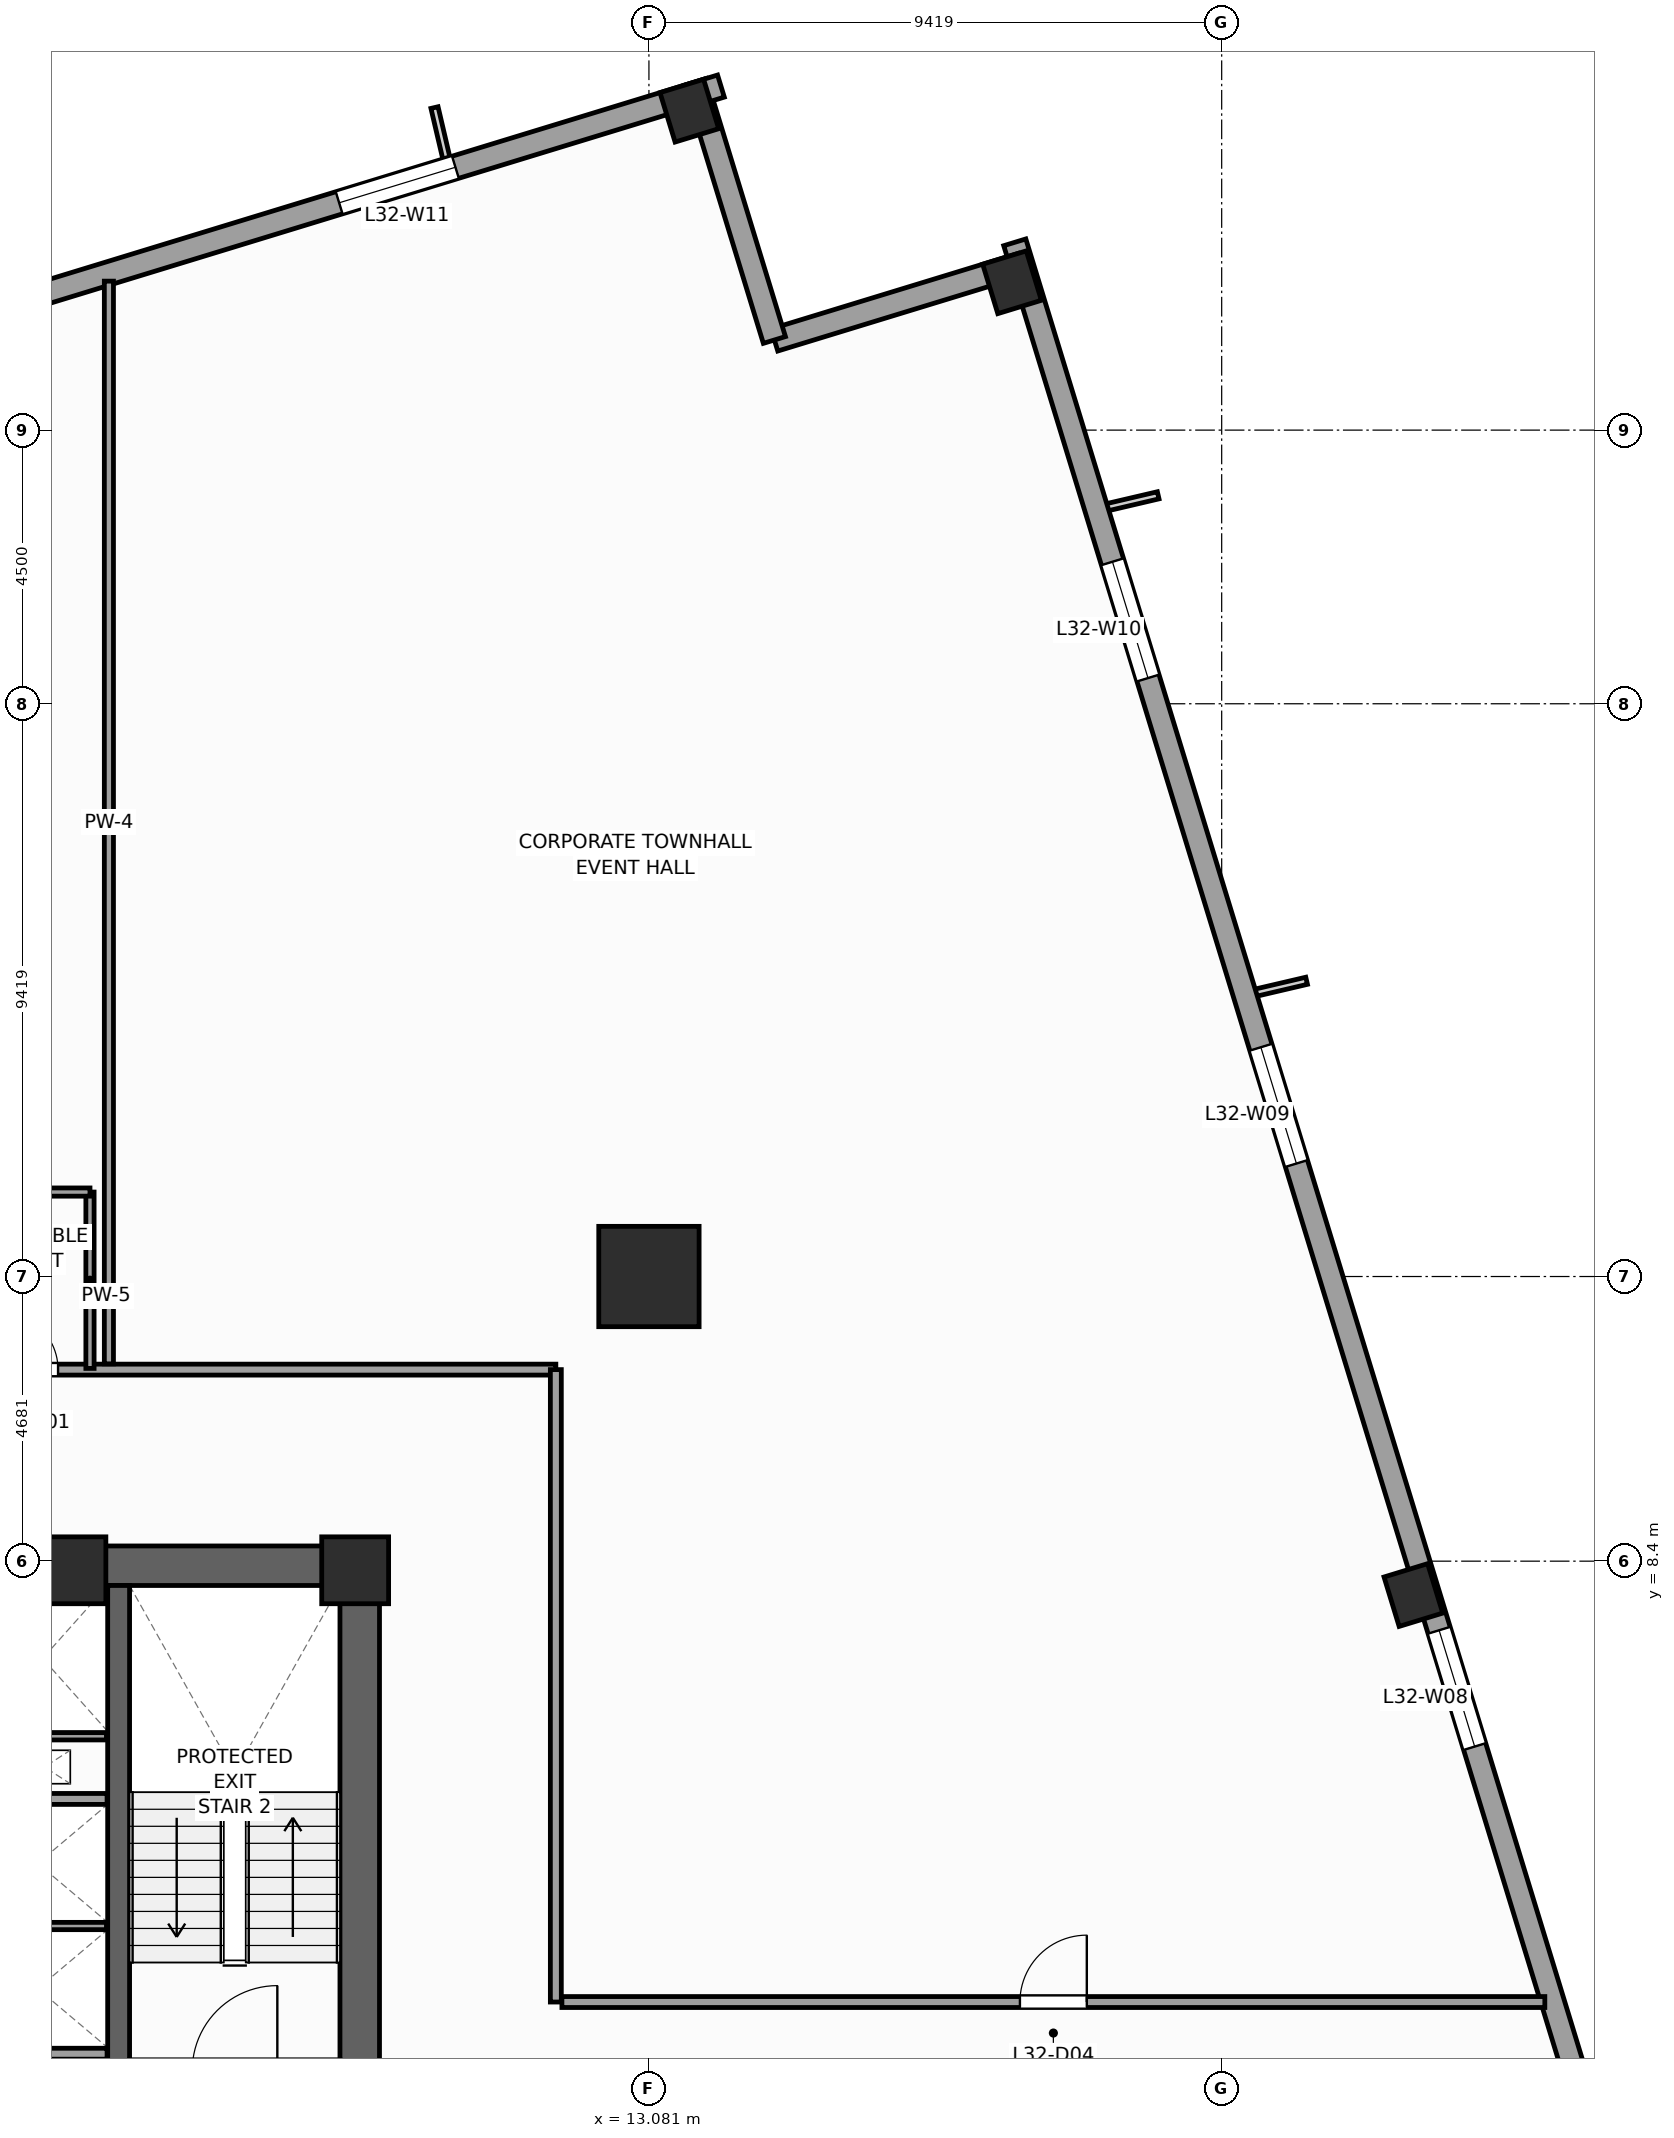
"""IFC4 building model, lengths in metres.
Left out: names, types, materials, properties, quantities, classifications, styles, units other than length and angle.
Written with IfcOpenShell. Run it as: python <this file> out.ifc"""

import sys

from ifc_helpers import new_model, si_unit, direction, frame, frame_2d, origin, origin_2d, place, context, subcontext, project, spatial, rectangle, extrude, source, transform, mapped, element, fill, save


model = new_model("IFC4")
c1 = context("Model", 3, precision=1e-05, world=origin(), true_north=direction((0.0, 1.0)))
c2 = subcontext(c1, "Body", "Model", "MODEL_VIEW")
j1 = project(units=[si_unit("LENGTHUNIT", "METRE"), si_unit("PLANEANGLEUNIT", "RADIAN")], contexts=[c1])
p1 = place(None, origin())
s1 = spatial("IfcSite", under=j1, at=p1, CompositionType="ELEMENT")
p2 = place(p1, origin())
s2 = spatial("IfcBuilding", under=s1, at=p2, CompositionType="ELEMENT")
p3 = place(p2, frame((0.0, 0.0, 135.2)))
s3 = spatial("IfcBuildingStorey", under=s2, at=p3, CompositionType="ELEMENT", Elevation=135.2)
p4 = place(p3, frame((-8.65, 8.325, 0.0), z_axis=(0.0, 0.0, 1.0), x_axis=(1.0, 0.0, 0.0)))
e1 = element("IfcWall", 1, at=p4, inside=s3, PredefinedType="SHEAR", context=c2, shape_type="SweptSolid", body=[
    extrude(rectangle(XDim=17.3, YDim=0.65, at=frame_2d((8.65, 0.0))), origin(), (0.0, 0.0, 1.0), 4.0),
])
p5 = place(p3, frame((8.325, -8.0, 0.0), z_axis=(0.0, 0.0, 1.0), x_axis=(0.0, 1.0, 0.0)))
e2 = element("IfcWall", 2, at=p5, inside=s3, PredefinedType="SHEAR", context=c2, shape_type="SweptSolid", body=[
    extrude(rectangle(XDim=16.0, YDim=0.65, at=frame_2d((8.0, 0.0))), origin(), (0.0, 0.0, 1.0), 4.0),
])
p6 = place(p5, frame((4.69, 0.0, 0.0)))
e3 = element("IfcOpeningElement", 3, at=p6, cuts=e2, PredefinedType="OPENING", context=c2, shape_type="SweptSolid", body=[
    extrude(rectangle(XDim=1.3, YDim=2.2, at=frame_2d((0.65, 1.1))), frame((0.0, 0.335, 0.0), z_axis=(0.0, -1.0, 0.0), x_axis=(1.0, 0.0, 0.0)), (0.0, 0.0, 1.0), 0.67),
])
p7 = place(p3, frame((4.36, -8.0, 0.0), z_axis=(0.0, 0.0, 1.0), x_axis=(0.0, 1.0, 0.0)))
e4 = element("IfcWall", 4, at=p7, inside=s3, PredefinedType="SHEAR", context=c2, shape_type="SweptSolid", body=[
    extrude(rectangle(XDim=16.0, YDim=0.36, at=frame_2d((8.0, 0.0))), origin(), (0.0, 0.0, 1.0), 4.0),
])
m1 = source(origin(), c2, "Body", "SweptSolid", [
    extrude(rectangle(XDim=1.1, YDim=1.1, at=origin_2d()), origin(), (0.0, 0.0, 1.0), 4.0),
])
for number, where, z_axis, x_axis in (
    (5, (8.25, 8.25, 0.0), (0.0, 0.0, 1.0), (1.0, 0.0, 0.0)),
    (6, (3.6, 8.25, 0.0), (0.0, 0.0, 1.0), (1.0, 0.0, 0.0)),
):
    element("IfcColumn", number, at=place(p3, frame(where, z_axis=z_axis, x_axis=x_axis)), inside=s3, PredefinedType="PILASTER", context=c2, shape_type="MappedRepresentation", body=[
        mapped(m1, transform((0.0, 0.0, 0.0), scale=1.0)),
    ])
m2 = source(origin(), c2, "Body", "SweptSolid", [
    extrude(rectangle(XDim=1.65, YDim=1.65, at=origin_2d()), origin(), (0.0, 0.0, 1.0), 4.0),
])
p8 = place(p3, frame((13.081, 13.081, 0.0), z_axis=(0.0, 0.0, 1.0), x_axis=(1.0, 0.0, 0.0)))
e7 = element("IfcColumn", 7, at=p8, inside=s3, PredefinedType="COLUMN", context=c2, shape_type="MappedRepresentation", body=[
    mapped(m2, transform((0.0, 0.0, 0.0), scale=1.0)),
])
m3 = source(origin(), c2, "Body", "SweptSolid", [
    extrude(rectangle(XDim=0.75, YDim=0.85, at=origin_2d()), origin(), (0.0, 0.0, 1.0), 4.0),
])
for number, where, z_axis, x_axis in (
    (8, (25.653, 7.843, 0.0), (0.0, 0.0, 1.0), (0.956, 0.292, 0.0)),
    (9, (19.052, 29.431, 0.0), (0.0, 0.0, 1.0), (0.956, 0.292, 0.0)),
    (10, (13.746, 32.253, 0.0), (0.0, 0.0, 1.0), (0.956, 0.292, 0.0)),
):
    element("IfcColumn", number, at=place(p3, frame(where, z_axis=z_axis, x_axis=x_axis)), inside=s3, PredefinedType="COLUMN", context=c2, shape_type="MappedRepresentation", body=[
        mapped(m3, transform((0.0, 0.0, 0.0), scale=1.0)),
    ])
p9 = place(p3, frame((32.658, -14.265, 0.0), z_axis=(0.0, 0.0, 1.0), x_axis=(-0.292373127906, 0.956304320851, 0.0)))
e11 = element("IfcWall", 11, at=p9, inside=s3, PredefinedType="STANDARD", context=c2, shape_type="SweptSolid", body=[
    extrude(rectangle(XDim=46.38, YDim=0.38, at=frame_2d((23.19, 0.0))), origin(), (0.0, 0.0, 1.0), 2.2),
])
p10 = place(p9, frame((4.566, 0.0, 0.67)))
e12 = element("IfcOpeningElement", 12, at=p10, cuts=e11, PredefinedType="OPENING", context=c2, shape_type="SweptSolid", body=[
    extrude(rectangle(XDim=2.0, YDim=1.45, at=frame_2d((1.0, 0.725))), frame((0.0, 0.2, 0.0), z_axis=(0.0, -1.0, 0.0), x_axis=(1.0, 0.0, 0.0)), (0.0, 0.0, 1.0), 0.4),
])
p11 = place(p9, frame((10.95, 0.0, 0.67)))
e13 = element("IfcOpeningElement", 13, at=p11, cuts=e11, PredefinedType="OPENING", context=c2, shape_type="SweptSolid", body=[
    extrude(rectangle(XDim=2.0, YDim=1.45, at=frame_2d((1.0, 0.725))), frame((0.0, 0.2, 0.0), z_axis=(0.0, -1.0, 0.0), x_axis=(1.0, 0.0, 0.0)), (0.0, 0.0, 1.0), 0.4),
])
p12 = place(p9, frame((20.512, 0.0, 0.67)))
e14 = element("IfcOpeningElement", 14, at=p12, cuts=e11, PredefinedType="OPENING", context=c2, shape_type="SweptSolid", body=[
    extrude(rectangle(XDim=2.0, YDim=1.45, at=frame_2d((1.0, 0.725))), frame((0.0, 0.2, 0.0), z_axis=(0.0, -1.0, 0.0), x_axis=(1.0, 0.0, 0.0)), (0.0, 0.0, 1.0), 0.4),
])
p13 = place(p9, frame((30.538, 0.0, 0.67)))
e15 = element("IfcOpeningElement", 15, at=p13, cuts=e11, PredefinedType="OPENING", context=c2, shape_type="SweptSolid", body=[
    extrude(rectangle(XDim=2.0, YDim=1.45, at=frame_2d((1.0, 0.725))), frame((0.0, 0.2, 0.0), z_axis=(0.0, -1.0, 0.0), x_axis=(1.0, 0.0, 0.0)), (0.0, 0.0, 1.0), 0.4),
])
p14 = place(p9, frame((38.887, 0.0, 0.67)))
e16 = element("IfcOpeningElement", 16, at=p14, cuts=e11, PredefinedType="OPENING", context=c2, shape_type="SweptSolid", body=[
    extrude(rectangle(XDim=2.0, YDim=1.45, at=frame_2d((1.0, 0.725))), frame((0.0, 0.2, 0.0), z_axis=(0.0, -1.0, 0.0), x_axis=(1.0, 0.0, 0.0)), (0.0, 0.0, 1.0), 0.4),
])
p15 = place(p3, frame((19.208, 29.725, 0.0), z_axis=(0.0, 0.0, 1.0), x_axis=(-0.956312764915, -0.292345507338, 0.0)))
e17 = element("IfcWall", 17, at=p15, inside=s3, PredefinedType="STANDARD", context=c2, shape_type="SweptSolid", body=[
    extrude(rectangle(XDim=4.25, YDim=0.38, at=frame_2d((2.125, 0.0))), origin(), (0.0, 0.0, 1.0), 3.6),
])
p16 = place(p3, frame((15.144, 28.482, 0.0), z_axis=(0.0, 0.0, 1.0), x_axis=(-0.292373601522, 0.956304176051, 0.0)))
e18 = element("IfcWall", 18, at=p16, inside=s3, PredefinedType="STANDARD", context=c2, shape_type="SweptSolid", body=[
    extrude(rectangle(XDim=4.44, YDim=0.38, at=frame_2d((2.22, 0.0))), origin(), (0.0, 0.0, 1.0), 2.2),
])
p17 = place(p3, frame((14.265, 32.658, 0.0), z_axis=(0.0, 0.0, 1.0), x_axis=(-0.956304320851, -0.292373127906, 0.0)))
e19 = element("IfcWall", 19, at=p17, inside=s3, PredefinedType="STANDARD", context=c2, shape_type="SweptSolid", body=[
    extrude(rectangle(XDim=46.38, YDim=0.38, at=frame_2d((23.19, 0.0))), origin(), (0.0, 0.0, 1.0), 2.2),
])
p18 = place(p17, frame((28.265, 0.0, 0.0)))
e20 = element("IfcOpeningElement", 20, at=p18, cuts=e19, PredefinedType="OPENING", context=c2, shape_type="SweptSolid", body=[
    extrude(rectangle(XDim=1.05, YDim=2.02, at=frame_2d((0.525, 1.01))), frame((0.0, 0.2, 0.0), z_axis=(0.0, -1.0, 0.0), x_axis=(1.0, 0.0, 0.0)), (0.0, 0.0, 1.0), 0.4),
])
p19 = place(p17, frame((4.566, 0.0, 0.67)))
e21 = element("IfcOpeningElement", 21, at=p19, cuts=e19, PredefinedType="OPENING", context=c2, shape_type="SweptSolid", body=[
    extrude(rectangle(XDim=2.0, YDim=1.45, at=frame_2d((1.0, 0.725))), frame((0.0, 0.2, 0.0), z_axis=(0.0, -1.0, 0.0), x_axis=(1.0, 0.0, 0.0)), (0.0, 0.0, 1.0), 0.4),
])
p20 = place(p17, frame((12.45, 0.0, 0.67)))
e22 = element("IfcOpeningElement", 22, at=p20, cuts=e19, PredefinedType="OPENING", context=c2, shape_type="SweptSolid", body=[
    extrude(rectangle(XDim=2.0, YDim=1.45, at=frame_2d((1.0, 0.725))), frame((0.0, 0.2, 0.0), z_axis=(0.0, -1.0, 0.0), x_axis=(1.0, 0.0, 0.0)), (0.0, 0.0, 1.0), 0.4),
])
p21 = place(p17, frame((20.512, 0.0, 0.67)))
e23 = element("IfcOpeningElement", 23, at=p21, cuts=e19, PredefinedType="OPENING", context=c2, shape_type="SweptSolid", body=[
    extrude(rectangle(XDim=2.0, YDim=1.45, at=frame_2d((1.0, 0.725))), frame((0.0, 0.2, 0.0), z_axis=(0.0, -1.0, 0.0), x_axis=(1.0, 0.0, 0.0)), (0.0, 0.0, 1.0), 0.4),
])
p22 = place(p17, frame((30.538, 0.0, 0.67)))
e24 = element("IfcOpeningElement", 24, at=p22, cuts=e19, PredefinedType="OPENING", context=c2, shape_type="SweptSolid", body=[
    extrude(rectangle(XDim=2.0, YDim=1.45, at=frame_2d((1.0, 0.725))), frame((0.0, 0.2, 0.0), z_axis=(0.0, -1.0, 0.0), x_axis=(1.0, 0.0, 0.0)), (0.0, 0.0, 1.0), 0.4),
])
p23 = place(p17, frame((38.887, 0.0, 0.67)))
e25 = element("IfcOpeningElement", 25, at=p23, cuts=e19, PredefinedType="OPENING", context=c2, shape_type="SweptSolid", body=[
    extrude(rectangle(XDim=2.0, YDim=1.45, at=frame_2d((1.0, 0.725))), frame((0.0, 0.2, 0.0), z_axis=(0.0, -1.0, 0.0), x_axis=(1.0, 0.0, 0.0)), (0.0, 0.0, 1.0), 0.4),
])
for number, where, z_axis, x_axis in (
    (26, (1.89, 0.3, 0.0), (0.0, 0.0, 1.0), (1.0, 0.0, 0.0)),
    (27, (1.89, 4.49, 0.0), (0.0, 0.0, 1.0), (1.0, 0.0, 0.0)),
):
    element("IfcWall", number, at=place(p3, frame(where, z_axis=z_axis, x_axis=x_axis)), inside=s3, PredefinedType="PARTITIONING", context=c2, shape_type="SweptSolid", body=[
        extrude(rectangle(XDim=2.28, YDim=0.18, at=frame_2d((1.14, 0.0))), origin(), (0.0, 0.0, 1.0), 3.6),
    ])
p24 = place(p3, frame((1.9, 2.4, 0.0), z_axis=(0.0, 0.0, 1.0), x_axis=(1.0, 0.0, 0.0)))
e28 = element("IfcWall", 28, at=p24, inside=s3, PredefinedType="PARTITIONING", context=c2, shape_type="SweptSolid", body=[
    extrude(rectangle(XDim=2.26, YDim=0.12, at=frame_2d((1.13, 0.0))), origin(), (0.0, 0.0, 1.0), 3.6),
])
p25 = place(p3, frame((2.06, 5.52, 0.0), z_axis=(0.0, 0.0, 1.0), x_axis=(1.0, 0.0, 0.0)))
e29 = element("IfcWall", 29, at=p25, inside=s3, PredefinedType="PARTITIONING", context=c2, shape_type="SweptSolid", body=[
    extrude(rectangle(XDim=2.1, YDim=0.12, at=frame_2d((1.05, 0.0))), origin(), (0.0, 0.0, 1.0), 3.6),
])
p26 = place(p3, frame((-12.6, 11.55, 0.0), z_axis=(0.0, 0.0, 1.0), x_axis=(1.0, 0.0, 0.0)))
e30 = element("IfcWall", 30, at=p26, inside=s3, PredefinedType="PARTITIONING", context=c2, shape_type="SweptSolid", body=[
    extrude(rectangle(XDim=24.15, YDim=0.18, at=frame_2d((12.075, 0.0))), origin(), (0.0, 0.0, 1.0), 3.6),
])
p27 = place(p26, frame((15.014, 0.0, 0.0)))
e31 = element("IfcOpeningElement", 31, at=p27, cuts=e30, PredefinedType="OPENING", context=c2, shape_type="SweptSolid", body=[
    extrude(rectangle(XDim=0.95, YDim=2.1, at=frame_2d((0.475, 1.05))), frame((0.0, 0.1, 0.0), z_axis=(0.0, -1.0, 0.0), x_axis=(1.0, 0.0, 0.0)), (0.0, 0.0, 1.0), 0.2),
])
p28 = place(p26, frame((12.59, 0.0, 0.0)))
e32 = element("IfcOpeningElement", 32, at=p28, cuts=e30, PredefinedType="OPENING", context=c2, shape_type="SweptSolid", body=[
    extrude(rectangle(XDim=0.95, YDim=2.1, at=frame_2d((0.475, 1.05))), frame((0.0, 0.1, 0.0), z_axis=(0.0, -1.0, 0.0), x_axis=(1.0, 0.0, 0.0)), (0.0, 0.0, 1.0), 0.2),
])
p29 = place(p3, frame((11.55, 1.15, 0.0), z_axis=(0.0, 0.0, 1.0), x_axis=(0.0, 1.0, 0.0)))
e33 = element("IfcWall", 33, at=p29, inside=s3, PredefinedType="PARTITIONING", context=c2, shape_type="SweptSolid", body=[
    extrude(rectangle(XDim=10.4, YDim=0.18, at=frame_2d((5.2, 0.0))), origin(), (0.0, 0.0, 1.0), 3.6),
])
p30 = place(p3, frame((11.65, 1.15, 0.0), z_axis=(0.0, 0.0, 1.0), x_axis=(1.0, 0.0, 0.0)))
e34 = element("IfcWall", 34, at=p30, inside=s3, PredefinedType="PARTITIONING", context=c2, shape_type="SweptSolid", body=[
    extrude(rectangle(XDim=16.164, YDim=0.18, at=frame_2d((8.082, 0.0))), origin(), (0.0, 0.0, 1.0), 3.6),
])
p31 = place(p30, frame((7.532, 0.0, 0.0)))
e35 = element("IfcOpeningElement", 35, at=p31, cuts=e34, PredefinedType="OPENING", context=c2, shape_type="SweptSolid", body=[
    extrude(rectangle(XDim=1.1, YDim=2.2, at=frame_2d((0.55, 1.1))), frame((0.0, 0.1, 0.0), z_axis=(0.0, -1.0, 0.0), x_axis=(1.0, 0.0, 0.0)), (0.0, 0.0, 1.0), 0.2),
])
p32 = place(p3, frame((4.2, 11.645, 0.0), z_axis=(0.0, 0.0, 1.0), x_axis=(0.0, 1.0, 0.0)))
e36 = element("IfcWall", 36, at=p32, inside=s3, PredefinedType="PARTITIONING", context=c2, shape_type="SweptSolid", body=[
    extrude(rectangle(XDim=17.805, YDim=0.15, at=frame_2d((8.902, 0.0))), origin(), (0.0, 0.0, 1.0), 3.6),
])
p33 = place(p3, frame((3.889, 11.57, 0.0), z_axis=(0.0, 0.0, 1.0), x_axis=(0.0, 1.0, 0.0)))
e37 = element("IfcWall", 37, at=p33, inside=s3, PredefinedType="PARTITIONING", context=c2, shape_type="SweptSolid", body=[
    extrude(rectangle(XDim=2.9, YDim=0.135, at=frame_2d((1.45, 0.0))), origin(), (0.0, 0.0, 1.0), 3.6),
])
p34 = place(p3, frame((1.889, 14.47, 0.0), z_axis=(0.0, 0.0, 1.0), x_axis=(1.0, 0.0, 0.0)))
e38 = element("IfcWall", 38, at=p34, inside=s3, PredefinedType="PARTITIONING", context=c2, shape_type="SweptSolid", body=[
    extrude(rectangle(XDim=2.0, YDim=0.135, at=frame_2d((1.0, 0.0))), origin(), (0.0, 0.0, 1.0), 3.6),
])
m4 = source(origin(), c2, "Body", "SweptSolid", [
    extrude(rectangle(XDim=2.0, YDim=1.45, at=frame_2d((1.0, 0.725))), frame((0.0, 0.03, 0.0), z_axis=(0.0, -1.0, 0.0), x_axis=(1.0, 0.0, 0.0)), (0.0, 0.0, 1.0), 0.06),
])
p35 = place(p12, origin())
e39 = element("IfcWindow", 39, at=p35, inside=s3, PartitioningType="SINGLE_PANEL", PredefinedType="WINDOW", context=c2, shape_type="MappedRepresentation", body=[
    mapped(m4, transform((0.0, 0.0, 0.0), scale=1.0)),
])
fill(e14, e39)
p36 = place(p13, origin())
e40 = element("IfcWindow", 40, at=p36, inside=s3, PartitioningType="SINGLE_PANEL", PredefinedType="WINDOW", context=c2, shape_type="MappedRepresentation", body=[
    mapped(m4, transform((0.0, 0.0, 0.0), scale=1.0)),
])
fill(e15, e40)
p37 = place(p14, origin())
e41 = element("IfcWindow", 41, at=p37, inside=s3, PartitioningType="SINGLE_PANEL", PredefinedType="WINDOW", context=c2, shape_type="MappedRepresentation", body=[
    mapped(m4, transform((0.0, 0.0, 0.0), scale=1.0)),
])
fill(e16, e41)
p38 = place(p19, origin())
e42 = element("IfcWindow", 42, at=p38, inside=s3, PartitioningType="SINGLE_PANEL", PredefinedType="WINDOW", context=c2, shape_type="MappedRepresentation", body=[
    mapped(m4, transform((0.0, 0.0, 0.0), scale=1.0)),
])
fill(e21, e42)
m5 = source(origin(), c2, "Body", "SweptSolid", [
    extrude(rectangle(XDim=0.95, YDim=2.1, at=frame_2d((0.475, 1.05))), frame((0.0, 0.025, 0.0), z_axis=(0.0, -1.0, 0.0), x_axis=(1.0, 0.0, 0.0)), (0.0, 0.0, 1.0), 0.05),
])
p39 = place(p27, origin())
e43 = element("IfcDoor", 43, at=p39, inside=s3, OperationType="SINGLE_SWING_LEFT", PredefinedType="DOOR", context=c2, shape_type="MappedRepresentation", body=[
    mapped(m5, transform((0.0, 0.0, 0.0), scale=1.0)),
])
fill(e31, e43)
m6 = source(origin(), c2, "Body", "SweptSolid", [
    extrude(rectangle(XDim=1.1, YDim=2.2, at=frame_2d((0.55, 1.1))), frame((0.0, 0.025, 0.0), z_axis=(0.0, -1.0, 0.0), x_axis=(1.0, 0.0, 0.0)), (0.0, 0.0, 1.0), 0.05),
])
p40 = place(p31, origin())
e44 = element("IfcDoor", 44, at=p40, inside=s3, OperationType="SINGLE_SWING_RIGHT", PredefinedType="DOOR", context=c2, shape_type="MappedRepresentation", body=[
    mapped(m6, transform((0.0, 0.0, 0.0), scale=1.0)),
])
fill(e35, e44)
save(model, sys.argv[1])
